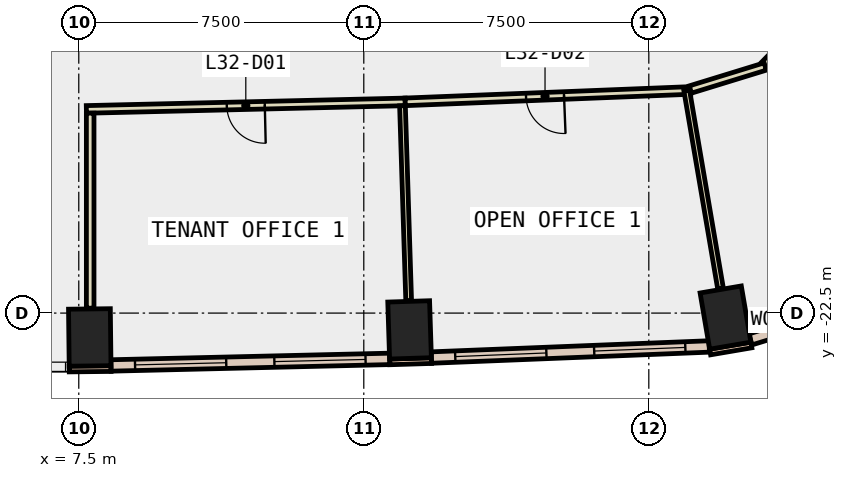
"""IFC4 building model, lengths in metres.
Left out: names, types, materials, properties, quantities, classifications, styles, units other than length and angle.
Written with IfcOpenShell. Run it as: python <this file> out.ifc"""

import sys

from ifc_helpers import new_model, si_unit, direction, frame, frame_2d, origin, origin_2d, place, context, subcontext, project, spatial, rectangle, extrude, element, fill, save


model = new_model("IFC4")
c1 = context("Model", 3, precision=1e-05, world=origin(), true_north=direction((0.0, 1.0)))
c2 = subcontext(c1, "Body", "Model", "MODEL_VIEW")
j1 = project(units=[si_unit("LENGTHUNIT", "METRE"), si_unit("PLANEANGLEUNIT", "RADIAN")], contexts=[c1])
p1 = place(None, origin())
s1 = spatial("IfcSite", under=j1, at=p1, CompositionType="ELEMENT")
p2 = place(p1, origin())
s2 = spatial("IfcBuilding", under=s1, at=p2, CompositionType="ELEMENT")
p3 = place(p2, frame((0.0, 0.0, 146.6)))
s3 = spatial("IfcBuildingStorey", under=s2, at=p3, CompositionType="ELEMENT", Elevation=146.6)
for number, where, z_axis, x_axis in (
    (1, (7.789, -23.141, -0.4), (0.0, 0.0, 1.0), (1.0, 0.012, 0.0)),
    (2, (16.205, -22.942, -0.4), (0.0, 0.0, 1.0), (0.999, 0.032, 0.0)),
    (3, (24.518, -22.618, -0.4), (0.0, 0.0, 1.0), (0.986, 0.168, 0.0)),
):
    element("IfcColumn", number, at=place(p3, frame(where, z_axis=z_axis, x_axis=x_axis)), inside=s3, PredefinedType="COLUMN", context=c2, shape_type="SweptSolid", body=[
        extrude(rectangle(XDim=1.1, YDim=1.5, at=origin_2d()), origin(), (0.0, 0.0, 1.0), 4.2),
    ])
p4 = place(p3, frame((7.249, -23.972, 0.0), z_axis=(0.0, 0.0, 1.0), x_axis=(0.999940879068, 0.010873746799, 0.0)))
e4 = element("IfcWall", 4, at=p4, inside=s3, PredefinedType="STANDARD", context=c2, shape_type="SweptSolid", body=[
    extrude(rectangle(XDim=1.1, YDim=0.15, at=frame_2d((0.55, 0.0))), origin(), (0.0, 0.0, 1.0), 3.8),
])
p5 = place(p3, frame((15.682, -23.784, 0.0), z_axis=(0.0, 0.0, 1.0), x_axis=(0.999523702549, 0.030860460829, 0.0)))
e5 = element("IfcWall", 5, at=p5, inside=s3, PredefinedType="STANDARD", context=c2, shape_type="SweptSolid", body=[
    extrude(rectangle(XDim=1.1, YDim=0.15, at=frame_2d((0.55, 0.0))), origin(), (0.0, 0.0, 1.0), 3.8),
])
p6 = place(p3, frame((24.114, -23.524, 0.0), z_axis=(0.0, 0.0, 1.0), x_axis=(0.985800082077, 0.167923191299, 0.0)))
e6 = element("IfcWall", 6, at=p6, inside=s3, PredefinedType="STANDARD", context=c2, shape_type="SweptSolid", body=[
    extrude(rectangle(XDim=1.101, YDim=0.15, at=frame_2d((0.55, 0.0))), origin(), (0.0, 0.0, 1.0), 3.8),
])
p7 = place(p3, frame((8.347, -23.878, 0.0), z_axis=(0.0, 0.0, 1.0), x_axis=(0.999722302867, 0.023565168146, 0.0)))
e7 = element("IfcWall", 7, at=p7, inside=s3, PredefinedType="STANDARD", context=c2, shape_type="SweptSolid", body=[
    extrude(rectangle(XDim=7.335, YDim=0.3, at=frame_2d((3.667, 0.0))), origin(), (0.0, 0.0, 1.0), 3.8),
])
p8 = place(p7, frame((0.634, 0.0, 0.9)))
e8 = element("IfcOpeningElement", 8, at=p8, cuts=e7, PredefinedType="OPENING", context=c2, shape_type="SweptSolid", body=[
    extrude(rectangle(XDim=2.4, YDim=2.6, at=frame_2d((1.2, 1.3))), frame((0.0, 0.16, 0.0), z_axis=(0.0, -1.0, 0.0), x_axis=(1.0, 0.0, 0.0)), (0.0, 0.0, 1.0), 0.32),
])
p9 = place(p7, frame((4.301, 0.0, 0.9)))
e9 = element("IfcOpeningElement", 9, at=p9, cuts=e7, PredefinedType="OPENING", context=c2, shape_type="SweptSolid", body=[
    extrude(rectangle(XDim=2.4, YDim=2.6, at=frame_2d((1.2, 1.3))), frame((0.0, 0.16, 0.0), z_axis=(0.0, -1.0, 0.0), x_axis=(1.0, 0.0, 0.0)), (0.0, 0.0, 1.0), 0.32),
])
p10 = place(p3, frame((16.778, -23.67, 0.0), z_axis=(0.0, 0.0, 1.0), x_axis=(0.999203621229, 0.039901420066, 0.0)))
e10 = element("IfcWall", 10, at=p10, inside=s3, PredefinedType="STANDARD", context=c2, shape_type="SweptSolid", body=[
    extrude(rectangle(XDim=7.318, YDim=0.3, at=frame_2d((3.659, 0.0))), origin(), (0.0, 0.0, 1.0), 3.8),
])
p11 = place(p10, frame((0.629, 0.0, 0.9)))
e11 = element("IfcOpeningElement", 11, at=p11, cuts=e10, PredefinedType="OPENING", context=c2, shape_type="SweptSolid", body=[
    extrude(rectangle(XDim=2.4, YDim=2.6, at=frame_2d((1.2, 1.3))), frame((0.0, 0.16, 0.0), z_axis=(0.0, -1.0, 0.0), x_axis=(1.0, 0.0, 0.0)), (0.0, 0.0, 1.0), 0.32),
])
p12 = place(p10, frame((4.288, 0.0, 0.9)))
e12 = element("IfcOpeningElement", 12, at=p12, cuts=e10, PredefinedType="OPENING", context=c2, shape_type="SweptSolid", body=[
    extrude(rectangle(XDim=2.4, YDim=2.6, at=frame_2d((1.2, 1.3))), frame((0.0, 0.16, 0.0), z_axis=(0.0, -1.0, 0.0), x_axis=(1.0, 0.0, 0.0)), (0.0, 0.0, 1.0), 0.32),
])
p13 = place(p3, frame((25.173, -23.193, 0.0), z_axis=(0.0, 0.0, 1.0), x_axis=(0.955874475611, 0.293775402094, 0.0)))
e13 = element("IfcWall", 13, at=p13, inside=s3, PredefinedType="STANDARD", context=c2, shape_type="SweptSolid", body=[
    extrude(rectangle(XDim=3.537, YDim=0.3, at=frame_2d((1.769, 0.0))), origin(), (0.0, 0.0, 1.0), 3.8),
])
p14 = place(p13, frame((1.069, 0.0, 0.9)))
e14 = element("IfcOpeningElement", 14, at=p14, cuts=e13, PredefinedType="OPENING", context=c2, shape_type="SweptSolid", body=[
    extrude(rectangle(XDim=1.4, YDim=2.6, at=frame_2d((0.7, 1.3))), frame((0.0, 0.16, 0.0), z_axis=(0.0, -1.0, 0.0), x_axis=(1.0, 0.0, 0.0)), (0.0, 0.0, 1.0), 0.32),
])
p15 = place(p3, frame((16.09, -16.943, 0.0), z_axis=(0.0, 0.0, 1.0), x_axis=(-0.999721662071, -0.023592337425, 0.0)))
e15 = element("IfcWall", 15, at=p15, inside=s3, PredefinedType="PARTITIONING", context=c2, shape_type="SweptSolid", body=[
    extrude(rectangle(XDim=8.393, YDim=0.2, at=frame_2d((4.196, 0.0))), origin(), (0.0, 0.0, 1.0), 3.8),
])
p16 = place(p15, frame((3.696, 0.0, 0.0)))
e16 = element("IfcOpeningElement", 16, at=p16, cuts=e15, PredefinedType="OPENING", context=c2, shape_type="SweptSolid", body=[
    extrude(rectangle(XDim=1.0, YDim=2.1, at=frame_2d((0.5, 1.05))), frame((0.0, 0.11, 0.0), z_axis=(0.0, -1.0, 0.0), x_axis=(1.0, 0.0, 0.0)), (0.0, 0.0, 1.0), 0.22),
])
p17 = place(p3, frame((23.598, -16.642, 0.0), z_axis=(0.0, 0.0, 1.0), x_axis=(-0.999203655486, -0.039900562205, 0.0)))
e17 = element("IfcWall", 17, at=p17, inside=s3, PredefinedType="PARTITIONING", context=c2, shape_type="SweptSolid", body=[
    extrude(rectangle(XDim=7.514, YDim=0.2, at=frame_2d((3.757, 0.0))), origin(), (0.0, 0.0, 1.0), 3.8),
])
p18 = place(p17, frame((3.332, 0.0, 0.0)))
e18 = element("IfcOpeningElement", 18, at=p18, cuts=e17, PredefinedType="OPENING", context=c2, shape_type="SweptSolid", body=[
    extrude(rectangle(XDim=1.0, YDim=2.1, at=frame_2d((0.5, 1.05))), frame((0.0, 0.11, 0.0), z_axis=(0.0, -1.0, 0.0), x_axis=(1.0, 0.0, 0.0)), (0.0, 0.0, 1.0), 0.22),
])
p19 = place(p3, frame((26.373, -15.114, 0.0), z_axis=(0.0, 0.0, 1.0), x_axis=(-0.698272822523, -0.715831729756, 0.0)))
e19 = element("IfcWall", 19, at=p19, inside=s3, PredefinedType="PARTITIONING", context=c2, shape_type="SweptSolid", body=[
    extrude(rectangle(XDim=1.196, YDim=0.2, at=frame_2d((0.598, 0.0))), origin(), (0.0, 0.0, 1.0), 3.8),
])
p20 = place(p3, frame((25.563, -16.012, 0.0), z_axis=(0.0, 0.0, 1.0), x_axis=(-0.955896815358, -0.293702704087, 0.0)))
e20 = element("IfcWall", 20, at=p20, inside=s3, PredefinedType="PARTITIONING", context=c2, shape_type="SweptSolid", body=[
    extrude(rectangle(XDim=2.06, YDim=0.2, at=frame_2d((1.03, 0.0))), origin(), (0.0, 0.0, 1.0), 3.8),
])
p21 = place(p3, frame((7.8, -17.239, 0.0), z_axis=(0.0, 0.0, 1.0), x_axis=(0.0, -1.0, 0.0)))
e21 = element("IfcWall", 21, at=p21, inside=s3, PredefinedType="PARTITIONING", context=c2, shape_type="SweptSolid", body=[
    extrude(rectangle(XDim=5.132, YDim=0.2, at=frame_2d((2.566, 0.0))), origin(), (0.0, 0.0, 1.0), 3.8),
])
p22 = place(p3, frame((16.018, -17.045, 0.0), z_axis=(0.0, 0.0, 1.0), x_axis=(0.031744385759, -0.999496019988, 0.0)))
e22 = element("IfcWall", 22, at=p22, inside=s3, PredefinedType="PARTITIONING", context=c2, shape_type="SweptSolid", body=[
    extrude(rectangle(XDim=5.13, YDim=0.15, at=frame_2d((2.565, 0.0))), origin(), (0.0, 0.0, 1.0), 3.8),
])
p23 = place(p3, frame((23.498, -16.646, 0.0), z_axis=(0.0, 0.0, 1.0), x_axis=(0.168275674737, -0.985739974482, 0.0)))
e23 = element("IfcWall", 23, at=p23, inside=s3, PredefinedType="PARTITIONING", context=c2, shape_type="SweptSolid", body=[
    extrude(rectangle(XDim=5.288, YDim=0.15, at=frame_2d((2.644, 0.0))), origin(), (0.0, 0.0, 1.0), 3.8),
])
p24 = place(p8, origin())
e24 = element("IfcWindow", 24, at=p24, inside=s3, PartitioningType="SINGLE_PANEL", PredefinedType="WINDOW", context=c2, shape_type="SweptSolid", body=[
    extrude(rectangle(XDim=2.4, YDim=2.6, at=frame_2d((1.2, 1.3))), frame((0.0, 0.03, 0.0), z_axis=(0.0, -1.0, 0.0), x_axis=(1.0, 0.0, 0.0)), (0.0, 0.0, 1.0), 0.06),
])
fill(e8, e24)
p25 = place(p9, origin())
e25 = element("IfcWindow", 25, at=p25, inside=s3, PartitioningType="SINGLE_PANEL", PredefinedType="WINDOW", context=c2, shape_type="SweptSolid", body=[
    extrude(rectangle(XDim=2.4, YDim=2.6, at=frame_2d((1.2, 1.3))), frame((0.0, 0.03, 0.0), z_axis=(0.0, -1.0, 0.0), x_axis=(1.0, 0.0, 0.0)), (0.0, 0.0, 1.0), 0.06),
])
fill(e9, e25)
p26 = place(p11, origin())
e26 = element("IfcWindow", 26, at=p26, inside=s3, PartitioningType="SINGLE_PANEL", PredefinedType="WINDOW", context=c2, shape_type="SweptSolid", body=[
    extrude(rectangle(XDim=2.4, YDim=2.6, at=frame_2d((1.2, 1.3))), frame((0.0, 0.03, 0.0), z_axis=(0.0, -1.0, 0.0), x_axis=(1.0, 0.0, 0.0)), (0.0, 0.0, 1.0), 0.06),
])
fill(e11, e26)
p27 = place(p12, origin())
e27 = element("IfcWindow", 27, at=p27, inside=s3, PartitioningType="SINGLE_PANEL", PredefinedType="WINDOW", context=c2, shape_type="SweptSolid", body=[
    extrude(rectangle(XDim=2.4, YDim=2.6, at=frame_2d((1.2, 1.3))), frame((0.0, 0.03, 0.0), z_axis=(0.0, -1.0, 0.0), x_axis=(1.0, 0.0, 0.0)), (0.0, 0.0, 1.0), 0.06),
])
fill(e12, e27)
p28 = place(p16, origin())
e28 = element("IfcDoor", 28, at=p28, inside=s3, OperationType="SINGLE_SWING_RIGHT", PredefinedType="DOOR", context=c2, shape_type="SweptSolid", body=[
    extrude(rectangle(XDim=1.0, YDim=2.1, at=frame_2d((0.5, 1.05))), frame((0.0, 0.025, 0.0), z_axis=(0.0, -1.0, 0.0), x_axis=(1.0, 0.0, 0.0)), (0.0, 0.0, 1.0), 0.05),
])
fill(e16, e28)
p29 = place(p18, origin())
e29 = element("IfcDoor", 29, at=p29, inside=s3, OperationType="SINGLE_SWING_LEFT", PredefinedType="DOOR", context=c2, shape_type="SweptSolid", body=[
    extrude(rectangle(XDim=1.0, YDim=2.1, at=frame_2d((0.5, 1.05))), frame((0.0, 0.025, 0.0), z_axis=(0.0, -1.0, 0.0), x_axis=(1.0, 0.0, 0.0)), (0.0, 0.0, 1.0), 0.05),
])
fill(e18, e29)
save(model, sys.argv[1])
